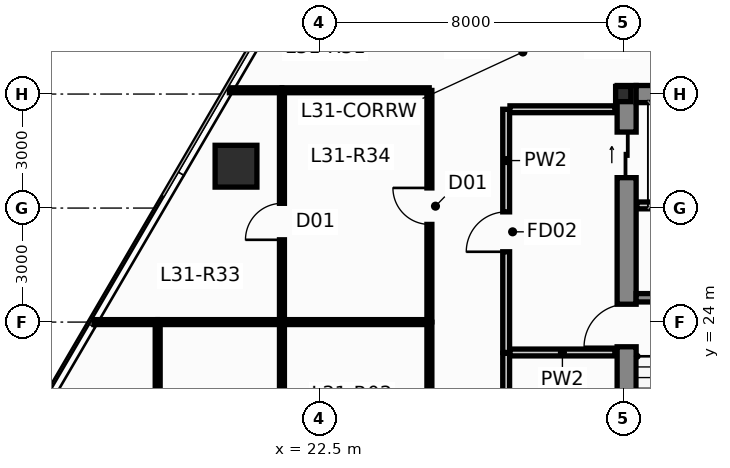
"""IFC4 building model, lengths in metres.
Left out: names, types, materials, properties, quantities, classifications, styles, units other than length and angle.
Written with IfcOpenShell. Run it as: python <this file> out.ifc"""

import sys

from ifc_helpers import new_model, si_unit, direction, frame, frame_2d, origin, origin_2d, place, context, subcontext, project, spatial, rectangle, hollow_rectangle, i_section, extrude, source, transform, mapped, element, fill, save


model = new_model("IFC4")
c1 = context("Model", 3, precision=1e-05, world=origin(), true_north=direction((0.0, 1.0)))
c2 = subcontext(c1, "Body", "Model", "MODEL_VIEW")
j1 = project(units=[si_unit("LENGTHUNIT", "METRE"), si_unit("PLANEANGLEUNIT", "RADIAN")], contexts=[c1])
p1 = place(None, origin())
s1 = spatial("IfcSite", under=j1, at=p1, CompositionType="ELEMENT")
p2 = place(p1, origin())
s2 = spatial("IfcBuilding", under=s1, at=p2, CompositionType="ELEMENT")
p3 = place(p2, frame((0.0, 0.0, 120.0)))
s3 = spatial("IfcBuildingStorey", under=s2, at=p3, CompositionType="ELEMENT", Elevation=120.0)
m1 = source(origin(), c2, "Body", "SweptSolid", [
    extrude(i_section(OverallWidth=0.4, OverallDepth=0.4, WebThickness=0.02, FlangeThickness=0.032, at=origin_2d()), origin(), (0.0, 0.0, 1.0), 3.65),
])
p4 = place(p3, frame((30.5, 30.0, 0.0), z_axis=(0.0, 0.0, 1.0), x_axis=(1.0, 0.0, 0.0)))
e1 = element("IfcColumn", 1, at=p4, inside=s3, PredefinedType="COLUMN", context=c2, shape_type="MappedRepresentation", body=[
    mapped(m1, transform((0.0, 0.0, 0.0), scale=1.0)),
])
p5 = place(p3, frame((30.59, 16.95, 0.0), z_axis=(0.0, 0.0, 1.0), x_axis=(0.0, 1.0, 0.0)))
e2 = element("IfcWall", 2, at=p5, inside=s3, PredefinedType="SHEAR", context=c2, shape_type="SweptSolid", body=[
    extrude(rectangle(XDim=13.275, YDim=0.5, at=frame_2d((6.638, 0.0))), origin(), (0.0, 0.0, 1.0), 3.65),
])
p6 = place(p5, frame((6.4, 0.0, 0.0)))
e3 = element("IfcOpeningElement", 3, at=p6, cuts=e2, PredefinedType="OPENING", context=c2, shape_type="SweptSolid", body=[
    extrude(rectangle(XDim=1.12, YDim=2.15, at=frame_2d((0.56, 1.075))), frame((0.0, 0.262, 0.0), z_axis=(0.0, -1.0, 0.0), x_axis=(1.0, 0.0, 0.0)), (0.0, 0.0, 1.0), 0.524),
])
p7 = place(p5, frame((10.85, 0.0, 0.0)))
e4 = element("IfcOpeningElement", 4, at=p7, cuts=e2, PredefinedType="OPENING", context=c2, shape_type="SweptSolid", body=[
    extrude(rectangle(XDim=1.2, YDim=2.2, at=frame_2d((0.6, 1.1))), frame((0.0, 0.262, 0.0), z_axis=(0.0, -1.0, 0.0), x_axis=(1.0, 0.0, 0.0)), (0.0, 0.0, 1.0), 0.524),
])
p8 = place(p3, frame((30.84, 30.0, 0.0), z_axis=(0.0, 0.0, 1.0), x_axis=(1.0, 0.0, 0.0)))
e5 = element("IfcWall", 5, at=p8, inside=s3, PredefinedType="SHEAR", context=c2, shape_type="SweptSolid", body=[
    extrude(rectangle(XDim=2.9, YDim=0.45, at=frame_2d((1.45, 0.0))), origin(), (0.0, 0.0, 1.0), 3.65),
])
p9 = place(p3, frame((30.84, 24.64, 0.0), z_axis=(0.0, 0.0, 1.0), x_axis=(1.0, 0.0, 0.0)))
e6 = element("IfcWall", 6, at=p9, inside=s3, PredefinedType="SHEAR", context=c2, shape_type="SweptSolid", body=[
    extrude(rectangle(XDim=2.9, YDim=0.22, at=frame_2d((1.45, 0.0))), origin(), (0.0, 0.0, 1.0), 3.65),
])
m2 = source(origin(), c2, "Body", "SweptSolid", [
    extrude(hollow_rectangle(XDim=1.1, YDim=1.1, WallThickness=0.06, at=origin_2d()), origin(), (0.0, 0.0, 1.0), 3.651),
])
p10 = place(p3, frame((20.311, 28.102, 0.0), z_axis=(0.014846438617, -0.013843300873, 0.999793951913), x_axis=(0.681966025159, 0.731383853069, 0.0)))
e7 = element("IfcColumn", 7, at=p10, inside=s3, PredefinedType="COLUMN", context=c2, shape_type="MappedRepresentation", body=[
    mapped(m2, transform((0.0, 0.0, 0.0), scale=1.0)),
])
p11 = place(p3, frame((27.42, 23.2, 0.0), z_axis=(0.0, 0.0, 1.0), x_axis=(0.0, 1.0, 0.0)))
e8 = element("IfcWall", 8, at=p11, inside=s3, PredefinedType="PARTITIONING", context=c2, shape_type="SweptSolid", body=[
    extrude(rectangle(XDim=6.4, YDim=0.18, at=frame_2d((3.2, 0.0))), origin(), (0.0, 0.0, 1.0), 3.026),
])
p12 = place(p11, frame((2.65, 0.0, 0.0)))
e9 = element("IfcOpeningElement", 9, at=p12, cuts=e8, PredefinedType="OPENING", context=c2, shape_type="SweptSolid", body=[
    extrude(rectangle(XDim=1.05, YDim=2.15, at=frame_2d((0.525, 1.075))), frame((0.0, 0.102, 0.0), z_axis=(0.0, -1.0, 0.0), x_axis=(1.0, 0.0, 0.0)), (0.0, 0.0, 1.0), 0.204),
])
p13 = place(p3, frame((27.52, 23.2, 0.0), z_axis=(0.0, 0.0, 1.0), x_axis=(1.0, 0.0, 0.0)))
e10 = element("IfcWall", 10, at=p13, inside=s3, PredefinedType="PARTITIONING", context=c2, shape_type="SweptSolid", body=[
    extrude(rectangle(XDim=2.76, YDim=0.18, at=frame_2d((1.38, 0.0))), origin(), (0.0, 0.0, 1.0), 3.4),
])
p14 = place(p3, frame((27.52, 29.6, 0.0), z_axis=(0.0, 0.0, 1.0), x_axis=(1.0, 0.0, 0.0)))
e11 = element("IfcWall", 11, at=p14, inside=s3, PredefinedType="PARTITIONING", context=c2, shape_type="SweptSolid", body=[
    extrude(rectangle(XDim=2.76, YDim=0.18, at=frame_2d((1.38, 0.0))), origin(), (0.0, 0.0, 1.0), 2.783),
])
p15 = place(p3, frame((30.86, 27.07, 0.0), z_axis=(0.0, 0.0, 1.0), x_axis=(1.0, 0.0, 0.0)))
e12 = element("IfcWall", 12, at=p15, inside=s3, PredefinedType="PARTITIONING", context=c2, shape_type="SweptSolid", body=[
    extrude(rectangle(XDim=2.9, YDim=0.18, at=frame_2d((1.45, 0.0))), origin(), (0.0, 0.0, 1.0), 3.4),
])
p16 = place(p3, frame((27.42, 17.15, 0.0), z_axis=(0.0, 0.0, 1.0), x_axis=(0.0, 1.0, 0.0)))
e13 = element("IfcWall", 13, at=p16, inside=s3, PredefinedType="PARTITIONING", context=c2, shape_type="SweptSolid", body=[
    extrude(rectangle(XDim=6.03, YDim=0.18, at=frame_2d((3.015, 0.0))), origin(), (0.0, 0.0, 1.0), 3.4),
])
p17 = place(p16, frame((2.45, 0.0, 0.0)))
e14 = element("IfcOpeningElement", 14, at=p17, cuts=e13, PredefinedType="OPENING", context=c2, shape_type="SweptSolid", body=[
    extrude(rectangle(XDim=1.05, YDim=2.15, at=frame_2d((0.525, 1.075))), frame((0.0, 0.102, 0.0), z_axis=(0.0, -1.0, 0.0), x_axis=(1.0, 0.0, 0.0)), (0.0, 0.0, 1.0), 0.204),
])
p18 = place(p3, frame((25.4, 17.105, 0.0), z_axis=(0.0, 0.0, 1.0), x_axis=(0.0, 1.0, 0.0)))
e15 = element("IfcWall", 15, at=p18, inside=s3, PredefinedType="PARTITIONING", context=c2, shape_type="SweptSolid", body=[
    extrude(rectangle(XDim=6.89, YDim=0.13, at=frame_2d((3.445, 0.0))), origin(), (0.0, 0.0, 1.0), 3.026),
])
p19 = place(p18, frame((2.965, 0.0, 0.0)))
e16 = element("IfcOpeningElement", 16, at=p19, cuts=e15, PredefinedType="OPENING", context=c2, shape_type="SweptSolid", body=[
    extrude(rectangle(XDim=0.96, YDim=2.15, at=frame_2d((0.48, 1.075))), frame((0.0, 0.077, 0.0), z_axis=(0.0, -1.0, 0.0), x_axis=(1.0, 0.0, 0.0)), (0.0, 0.0, 1.0), 0.154),
])
p20 = place(p3, frame((18.25, 17.105, 0.0), z_axis=(0.0, 0.0, 1.0), x_axis=(0.0, 1.0, 0.0)))
e17 = element("IfcWall", 17, at=p20, inside=s3, PredefinedType="PARTITIONING", context=c2, shape_type="SweptSolid", body=[
    extrude(rectangle(XDim=6.89, YDim=0.13, at=frame_2d((3.445, 0.0))), origin(), (0.0, 0.0, 1.0), 3.4),
])
p21 = place(p3, frame((21.52, 17.105, 0.0), z_axis=(0.0, 0.0, 1.0), x_axis=(0.0, 1.0, 0.0)))
e18 = element("IfcWall", 18, at=p21, inside=s3, PredefinedType="PARTITIONING", context=c2, shape_type="SweptSolid", body=[
    extrude(rectangle(XDim=6.89, YDim=0.13, at=frame_2d((3.445, 0.0))), origin(), (0.0, 0.0, 1.0), 3.026),
])
p22 = place(p3, frame((25.4, 24.005, 0.0), z_axis=(0.0, 0.0, 1.0), x_axis=(0.0, 1.0, 0.0)))
e19 = element("IfcWall", 19, at=p22, inside=s3, PredefinedType="PARTITIONING", context=c2, shape_type="SweptSolid", body=[
    extrude(rectangle(XDim=6.09, YDim=0.13, at=frame_2d((3.045, 0.0))), origin(), (0.0, 0.0, 1.0), 3.026),
])
p23 = place(p22, frame((2.565, 0.0, 0.0)))
e20 = element("IfcOpeningElement", 20, at=p23, cuts=e19, PredefinedType="OPENING", context=c2, shape_type="SweptSolid", body=[
    extrude(rectangle(XDim=0.96, YDim=2.15, at=frame_2d((0.48, 1.075))), frame((0.0, 0.077, 0.0), z_axis=(0.0, -1.0, 0.0), x_axis=(1.0, 0.0, 0.0)), (0.0, 0.0, 1.0), 0.154),
])
p24 = place(p3, frame((21.52, 24.005, 0.0), z_axis=(0.0, 0.0, 1.0), x_axis=(0.0, 1.0, 0.0)))
e21 = element("IfcWall", 21, at=p24, inside=s3, PredefinedType="PARTITIONING", context=c2, shape_type="SweptSolid", body=[
    extrude(rectangle(XDim=6.09, YDim=0.13, at=frame_2d((3.045, 0.0))), origin(), (0.0, 0.0, 1.0), 3.026),
])
p25 = place(p24, frame((2.16, 0.0, 0.0)))
e22 = element("IfcOpeningElement", 22, at=p25, cuts=e21, PredefinedType="OPENING", context=c2, shape_type="SweptSolid", body=[
    extrude(rectangle(XDim=0.96, YDim=2.15, at=frame_2d((0.48, 1.075))), frame((0.0, 0.077, 0.0), z_axis=(0.0, -1.0, 0.0), x_axis=(1.0, 0.0, 0.0)), (0.0, 0.0, 1.0), 0.154),
])
for number, where, z_axis, x_axis in (
    (23, (25.395, 30.1, 0.0), (0.0, 0.0, 1.0), (-1.0, 0.0, 0.0)),
    (24, (21.525, 24.0, 0.0), (0.0, 0.0, 1.0), (1.0, 0.0, 0.0)),
):
    element("IfcWall", number, at=place(p3, frame(where, z_axis=z_axis, x_axis=x_axis)), inside=s3, PredefinedType="PARTITIONING", context=c2, shape_type="SweptSolid", body=[
        extrude(rectangle(XDim=3.87, YDim=0.13, at=frame_2d((1.935, 0.0))), origin(), (0.0, 0.0, 1.0), 3.4),
    ])
p26 = place(p3, frame((18.255, 24.0, 0.0), z_axis=(0.0, 0.0, 1.0), x_axis=(1.0, 0.0, 0.0)))
e25 = element("IfcWall", 25, at=p26, inside=s3, PredefinedType="PARTITIONING", context=c2, shape_type="SweptSolid", body=[
    extrude(rectangle(XDim=3.26, YDim=0.13, at=frame_2d((1.63, 0.0))), origin(), (0.0, 0.0, 1.0), 3.4),
])
p27 = place(p3, frame((16.573, 24.0, 0.0), z_axis=(0.0, 0.0, 1.0), x_axis=(1.0, 0.0, 0.0)))
e26 = element("IfcWall", 26, at=p27, inside=s3, PredefinedType="PARTITIONING", context=c2, shape_type="SweptSolid", body=[
    extrude(rectangle(XDim=1.672, YDim=0.13, at=frame_2d((0.836, 0.0))), origin(), (0.0, 0.0, 1.0), 3.4),
])
p28 = place(p3, frame((20.137, 30.1, 0.0), z_axis=(0.0, 0.0, 1.0), x_axis=(1.0, 0.0, 0.0)))
e27 = element("IfcWall", 27, at=p28, inside=s3, PredefinedType="PARTITIONING", context=c2, shape_type="SweptSolid", body=[
    extrude(rectangle(XDim=1.377, YDim=0.13, at=frame_2d((0.689, 0.0))), origin(), (0.0, 0.0, 1.0), 3.4),
])
p29 = place(p6, origin())
e28 = element("IfcDoor", 28, at=p29, inside=s3, OperationType="SINGLE_SWING_LEFT", PredefinedType="DOOR", context=c2, shape_type="SweptSolid", body=[
    extrude(rectangle(XDim=1.12, YDim=2.15, at=frame_2d((0.56, 1.075))), frame((0.0, 0.025, 0.0), z_axis=(0.0, -1.0, 0.0), x_axis=(1.0, 0.0, 0.0)), (0.0, 0.0, 1.0), 0.05),
])
fill(e3, e28)
p30 = place(p7, origin())
e29 = element("IfcDoor", 29, at=p30, inside=s3, OperationType="SLIDING_TO_LEFT", PredefinedType="DOOR", context=c2, shape_type="SweptSolid", body=[
    extrude(rectangle(XDim=1.2, YDim=2.2, at=frame_2d((0.6, 1.1))), frame((0.0, 0.025, 0.0), z_axis=(0.0, -1.0, 0.0), x_axis=(1.0, 0.0, 0.0)), (0.0, 0.0, 1.0), 0.05),
])
fill(e4, e29)
p31 = place(p12, origin())
e30 = element("IfcDoor", 30, at=p31, inside=s3, OperationType="SINGLE_SWING_LEFT", PredefinedType="DOOR", context=c2, shape_type="SweptSolid", body=[
    extrude(rectangle(XDim=1.05, YDim=2.15, at=frame_2d((0.525, 1.075))), frame((0.0, 0.025, 0.0), z_axis=(0.0, -1.0, 0.0), x_axis=(1.0, 0.0, 0.0)), (0.0, 0.0, 1.0), 0.05),
])
fill(e9, e30)
p32 = place(p23, origin())
e31 = element("IfcDoor", 31, at=p32, inside=s3, OperationType="SINGLE_SWING_RIGHT", PredefinedType="DOOR", context=c2, shape_type="SweptSolid", body=[
    extrude(rectangle(XDim=0.96, YDim=2.15, at=frame_2d((0.48, 1.075))), frame((0.0, 0.025, 0.0), z_axis=(0.0, -1.0, 0.0), x_axis=(1.0, 0.0, 0.0)), (0.0, 0.0, 1.0), 0.05),
])
fill(e20, e31)
p33 = place(p25, origin())
e32 = element("IfcDoor", 32, at=p33, inside=s3, OperationType="SINGLE_SWING_LEFT", PredefinedType="DOOR", context=c2, shape_type="SweptSolid", body=[
    extrude(rectangle(XDim=0.96, YDim=2.15, at=frame_2d((0.48, 1.075))), frame((0.0, 0.025, 0.0), z_axis=(0.0, -1.0, 0.0), x_axis=(1.0, 0.0, 0.0)), (0.0, 0.0, 1.0), 0.05),
])
fill(e22, e32)
save(model, sys.argv[1])
